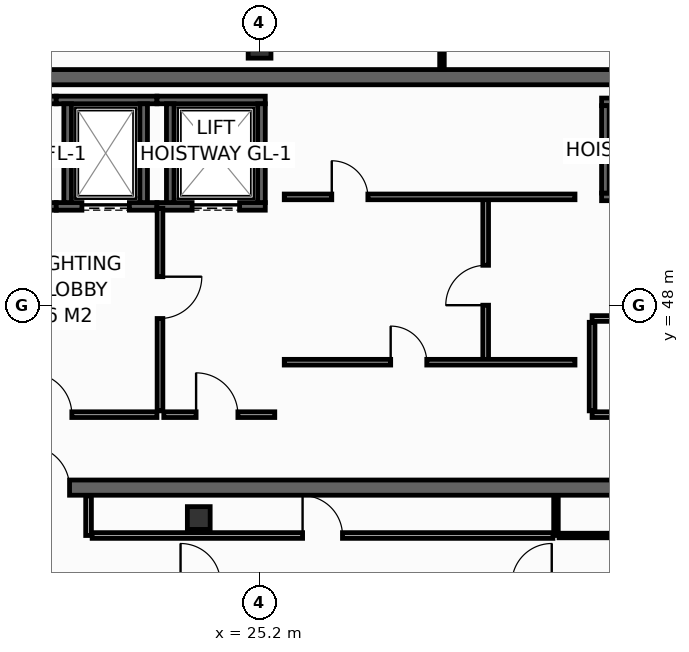
"""IFC4 building model, lengths in metres.
Left out: names, types, materials, properties, quantities, classifications, styles, units other than length and angle.
Written with IfcOpenShell. Run it as: python <this file> out.ifc"""

import sys

from ifc_helpers import new_model, si_unit, direction, frame, frame_2d, origin, origin_2d, place, context, subcontext, project, spatial, rectangle, hollow_rectangle, extrude, element, fill, save


model = new_model("IFC4")
c1 = context("Model", 3, precision=1e-05, world=origin(), true_north=direction((0.0, 1.0)))
c2 = subcontext(c1, "Body", "Model", "MODEL_VIEW")
j1 = project(units=[si_unit("LENGTHUNIT", "METRE"), si_unit("PLANEANGLEUNIT", "RADIAN")], contexts=[c1])
p1 = place(None, origin())
s1 = spatial("IfcSite", under=j1, at=p1, CompositionType="ELEMENT")
p2 = place(p1, origin())
s2 = spatial("IfcBuilding", under=s1, at=p2, CompositionType="ELEMENT")
p3 = place(p2, frame((0.0, 0.0, 295.2)))
s3 = spatial("IfcBuildingStorey", under=s2, at=p3, CompositionType="ELEMENT", Elevation=295.2)
p4 = place(p3, frame((13.7, 43.2, 0.0), z_axis=(0.0, 0.0, 1.0), x_axis=(1.0, 0.0, 0.0)))
e1 = element("IfcWall", 1, at=p4, inside=s3, PredefinedType="SHEAR", context=c2, shape_type="SweptSolid", body=[
    extrude(rectangle(XDim=32.5, YDim=0.4, at=frame_2d((16.25, 0.0))), origin(), (0.0, 0.0, 1.0), 3.55),
])
p5 = place(p4, frame((5.4, 0.0, 0.0)))
e2 = element("IfcOpeningElement", 2, at=p5, cuts=e1, PredefinedType="OPENING", context=c2, shape_type="SweptSolid", body=[
    extrude(rectangle(XDim=1.1, YDim=2.15, at=frame_2d((0.55, 1.075))), frame((0.0, 0.21, 0.0), z_axis=(0.0, -1.0, 0.0), x_axis=(1.0, 0.0, 0.0)), (0.0, 0.0, 1.0), 0.42),
])
p6 = place(p4, frame((25.6, 0.0, 0.0)))
e3 = element("IfcOpeningElement", 3, at=p6, cuts=e1, PredefinedType="OPENING", context=c2, shape_type="SweptSolid", body=[
    extrude(rectangle(XDim=1.1, YDim=2.15, at=frame_2d((0.55, 1.075))), frame((0.0, 0.21, 0.0), z_axis=(0.0, -1.0, 0.0), x_axis=(1.0, 0.0, 0.0)), (0.0, 0.0, 1.0), 0.42),
])
p7 = place(p3, frame((13.7, 54.0, 0.0), z_axis=(0.0, 0.0, 1.0), x_axis=(1.0, 0.0, 0.0)))
e4 = element("IfcWall", 4, at=p7, inside=s3, PredefinedType="SHEAR", context=c2, shape_type="SweptSolid", body=[
    extrude(rectangle(XDim=32.5, YDim=0.4, at=frame_2d((16.25, 0.0))), origin(), (0.0, 0.0, 1.0), 3.55),
])
for number, where, z_axis, x_axis in (
    (5, (25.2, 54.8, 0.0), (0.0, 0.0, 1.0), (1.0, 0.0, 0.0)),
    (6, (23.6, 42.4, 0.0), (0.0, 0.0, 1.0), (1.0, 0.0, 0.0)),
):
    element("IfcColumn", number, at=place(p3, frame(where, z_axis=z_axis, x_axis=x_axis)), inside=s3, PredefinedType="COLUMN", context=c2, shape_type="SweptSolid", body=[
        extrude(hollow_rectangle(XDim=0.6, YDim=0.6, WallThickness=0.028, at=origin_2d()), origin(), (0.0, 0.0, 1.0), 3.8),
    ])
p8 = place(p3, frame((17.33, 50.6, 0.0), z_axis=(0.0, 0.0, 1.0), x_axis=(1.0, 0.0, 0.0)))
e7 = element("IfcWall", 7, at=p8, inside=s3, PredefinedType="SHEAR", context=c2, shape_type="SweptSolid", body=[
    extrude(rectangle(XDim=2.52, YDim=0.2, at=frame_2d((1.26, 0.0))), origin(), (0.0, 0.0, 1.0), 3.55),
])
p9 = place(p8, frame((0.595, 0.0, 0.0)))
e8 = element("IfcOpeningElement", 8, at=p9, cuts=e7, PredefinedType="OPENING", context=c2, shape_type="SweptSolid", body=[
    extrude(rectangle(XDim=1.25, YDim=2.3, at=frame_2d((0.625, 1.15))), frame((0.0, 0.11, 0.0), z_axis=(0.0, -1.0, 0.0), x_axis=(1.0, 0.0, 0.0)), (0.0, 0.0, 1.0), 0.22),
])
p10 = place(p3, frame((17.33, 53.4, 0.0), z_axis=(0.0, 0.0, 1.0), x_axis=(1.0, 0.0, 0.0)))
e9 = element("IfcWall", 9, at=p10, inside=s3, PredefinedType="SHEAR", context=c2, shape_type="SweptSolid", body=[
    extrude(rectangle(XDim=2.52, YDim=0.2, at=frame_2d((1.26, 0.0))), origin(), (0.0, 0.0, 1.0), 3.55),
])
p11 = place(p3, frame((19.85, 50.6, 0.0), z_axis=(0.0, 0.0, 1.0), x_axis=(1.0, 0.0, 0.0)))
e10 = element("IfcWall", 10, at=p11, inside=s3, PredefinedType="SHEAR", context=c2, shape_type="SweptSolid", body=[
    extrude(rectangle(XDim=2.65, YDim=0.2, at=frame_2d((1.325, 0.0))), origin(), (0.0, 0.0, 1.0), 3.55),
])
p12 = place(p11, frame((0.675, 0.0, 0.0)))
e11 = element("IfcOpeningElement", 11, at=p12, cuts=e10, PredefinedType="OPENING", context=c2, shape_type="SweptSolid", body=[
    extrude(rectangle(XDim=1.25, YDim=2.3, at=frame_2d((0.625, 1.15))), frame((0.0, 0.11, 0.0), z_axis=(0.0, -1.0, 0.0), x_axis=(1.0, 0.0, 0.0)), (0.0, 0.0, 1.0), 0.22),
])
p13 = place(p3, frame((19.85, 53.4, 0.0), z_axis=(0.0, 0.0, 1.0), x_axis=(1.0, 0.0, 0.0)))
e12 = element("IfcWall", 12, at=p13, inside=s3, PredefinedType="SHEAR", context=c2, shape_type="SweptSolid", body=[
    extrude(rectangle(XDim=2.65, YDim=0.2, at=frame_2d((1.325, 0.0))), origin(), (0.0, 0.0, 1.0), 3.55),
])
for number, where, z_axis, x_axis in (
    (13, (20.15, 50.7, 0.0), (0.0, 0.0, 1.0), (0.0, 1.0, 0.0)),
    (14, (22.15, 50.7, 0.0), (0.0, 0.0, 1.0), (0.0, 1.0, 0.0)),
):
    element("IfcWall", number, at=place(p3, frame(where, z_axis=z_axis, x_axis=x_axis)), inside=s3, PredefinedType="SHEAR", context=c2, shape_type="SweptSolid", body=[
        extrude(rectangle(XDim=2.6, YDim=0.2, at=frame_2d((1.3, 0.0))), origin(), (0.0, 0.0, 1.0), 3.55),
    ])
p14 = place(p3, frame((22.5, 50.6, 0.0), z_axis=(0.0, 0.0, 1.0), x_axis=(1.0, 0.0, 0.0)))
e15 = element("IfcWall", 15, at=p14, inside=s3, PredefinedType="SHEAR", context=c2, shape_type="SweptSolid", body=[
    extrude(rectangle(XDim=2.85, YDim=0.2, at=frame_2d((1.425, 0.0))), origin(), (0.0, 0.0, 1.0), 3.55),
])
p15 = place(p14, frame((0.925, 0.0, 0.0)))
e16 = element("IfcOpeningElement", 16, at=p15, cuts=e15, PredefinedType="OPENING", context=c2, shape_type="SweptSolid", body=[
    extrude(rectangle(XDim=1.25, YDim=2.3, at=frame_2d((0.625, 1.15))), frame((0.0, 0.11, 0.0), z_axis=(0.0, -1.0, 0.0), x_axis=(1.0, 0.0, 0.0)), (0.0, 0.0, 1.0), 0.22),
])
p16 = place(p3, frame((22.5, 53.4, 0.0), z_axis=(0.0, 0.0, 1.0), x_axis=(1.0, 0.0, 0.0)))
e17 = element("IfcWall", 17, at=p16, inside=s3, PredefinedType="SHEAR", context=c2, shape_type="SweptSolid", body=[
    extrude(rectangle(XDim=2.85, YDim=0.2, at=frame_2d((1.425, 0.0))), origin(), (0.0, 0.0, 1.0), 3.55),
])
for number, where, z_axis, x_axis in (
    (18, (22.85, 50.7, 0.0), (0.0, 0.0, 1.0), (0.0, 1.0, 0.0)),
    (19, (25.25, 50.7, 0.0), (0.0, 0.0, 1.0), (0.0, 1.0, 0.0)),
):
    element("IfcWall", number, at=place(p3, frame(where, z_axis=z_axis, x_axis=x_axis)), inside=s3, PredefinedType="SHEAR", context=c2, shape_type="SweptSolid", body=[
        extrude(rectangle(XDim=2.6, YDim=0.2, at=frame_2d((1.3, 0.0))), origin(), (0.0, 0.0, 1.0), 3.55),
    ])
p17 = place(p3, frame((34.2, 50.85, 0.0), z_axis=(0.0, 0.0, 1.0), x_axis=(1.0, 0.0, 0.0)))
e20 = element("IfcWall", 20, at=p17, inside=s3, PredefinedType="SHEAR", context=c2, shape_type="SweptSolid", body=[
    extrude(rectangle(XDim=2.575, YDim=0.2, at=frame_2d((1.288, 0.0))), origin(), (0.0, 0.0, 1.0), 3.55),
])
p18 = place(p17, frame((0.65, 0.0, 0.0)))
e21 = element("IfcOpeningElement", 21, at=p18, cuts=e20, PredefinedType="OPENING", context=c2, shape_type="SweptSolid", body=[
    extrude(rectangle(XDim=1.1, YDim=2.2, at=frame_2d((0.55, 1.1))), frame((0.0, 0.11, 0.0), z_axis=(0.0, -1.0, 0.0), x_axis=(1.0, 0.0, 0.0)), (0.0, 0.0, 1.0), 0.22),
])
p19 = place(p3, frame((34.2, 53.35, 0.0), z_axis=(0.0, 0.0, 1.0), x_axis=(1.0, 0.0, 0.0)))
e22 = element("IfcWall", 22, at=p19, inside=s3, PredefinedType="SHEAR", context=c2, shape_type="SweptSolid", body=[
    extrude(rectangle(XDim=2.575, YDim=0.2, at=frame_2d((1.288, 0.0))), origin(), (0.0, 0.0, 1.0), 3.55),
])
p20 = place(p3, frame((34.3, 50.95, 0.0), z_axis=(0.0, 0.0, 1.0), x_axis=(0.0, 1.0, 0.0)))
e23 = element("IfcWall", 23, at=p20, inside=s3, PredefinedType="SHEAR", context=c2, shape_type="SweptSolid", body=[
    extrude(rectangle(XDim=2.3, YDim=0.2, at=frame_2d((1.15, 0.0))), origin(), (0.0, 0.0, 1.0), 3.55),
])
p21 = place(p3, frame((17.36, 45.12, 0.0), z_axis=(0.0, 0.0, 1.0), x_axis=(1.0, 0.0, 0.0)))
e24 = element("IfcWall", 24, at=p21, inside=s3, PredefinedType="PARTITIONING", context=c2, shape_type="SweptSolid", body=[
    extrude(rectangle(XDim=5.14, YDim=0.15, at=frame_2d((2.57, 0.0))), origin(), (0.0, 0.0, 1.0), 3.55),
])
p22 = place(p21, frame((1.8, 0.0, 0.0)))
e25 = element("IfcOpeningElement", 25, at=p22, cuts=e24, PredefinedType="OPENING", context=c2, shape_type="SweptSolid", body=[
    extrude(rectangle(XDim=1.1, YDim=2.15, at=frame_2d((0.55, 1.075))), frame((0.0, 0.085, 0.0), z_axis=(0.0, -1.0, 0.0), x_axis=(1.0, 0.0, 0.0)), (0.0, 0.0, 1.0), 0.17),
])
p23 = place(p3, frame((22.58, 50.55, 0.0), z_axis=(0.0, 0.0, 1.0), x_axis=(0.0, -1.0, 0.0)))
e26 = element("IfcWall", 26, at=p23, inside=s3, PredefinedType="PARTITIONING", context=c2, shape_type="SweptSolid", body=[
    extrude(rectangle(XDim=5.33, YDim=0.15, at=frame_2d((2.665, 0.0))), origin(), (0.0, 0.0, 1.0), 3.55),
])
p24 = place(p23, frame((1.8, 0.0, 0.0)))
e27 = element("IfcOpeningElement", 27, at=p24, cuts=e26, PredefinedType="OPENING", context=c2, shape_type="SweptSolid", body=[
    extrude(rectangle(XDim=1.1, YDim=2.15, at=frame_2d((0.55, 1.075))), frame((0.0, 0.085, 0.0), z_axis=(0.0, -1.0, 0.0), x_axis=(1.0, 0.0, 0.0)), (0.0, 0.0, 1.0), 0.17),
])
p25 = place(p3, frame((22.68, 45.12, 0.0), z_axis=(0.0, 0.0, 1.0), x_axis=(1.0, 0.0, 0.0)))
e28 = element("IfcWall", 28, at=p25, inside=s3, PredefinedType="PARTITIONING", context=c2, shape_type="SweptSolid", body=[
    extrude(rectangle(XDim=2.92, YDim=0.15, at=frame_2d((1.46, 0.0))), origin(), (0.0, 0.0, 1.0), 3.55),
])
p26 = place(p25, frame((0.85, 0.0, 0.0)))
e29 = element("IfcOpeningElement", 29, at=p26, cuts=e28, PredefinedType="OPENING", context=c2, shape_type="SweptSolid", body=[
    extrude(rectangle(XDim=1.1, YDim=2.15, at=frame_2d((0.55, 1.075))), frame((0.0, 0.085, 0.0), z_axis=(0.0, -1.0, 0.0), x_axis=(1.0, 0.0, 0.0)), (0.0, 0.0, 1.0), 0.17),
])
p27 = place(p3, frame((31.15, 46.5, 0.0), z_axis=(0.0, 0.0, 1.0), x_axis=(0.0, 1.0, 0.0)))
e30 = element("IfcWall", 30, at=p27, inside=s3, PredefinedType="PARTITIONING", context=c2, shape_type="SweptSolid", body=[
    extrude(rectangle(XDim=4.35, YDim=0.15, at=frame_2d((2.175, 0.0))), origin(), (0.0, 0.0, 1.0), 3.55),
])
p28 = place(p27, frame((1.5, 0.0, 0.0)))
e31 = element("IfcOpeningElement", 31, at=p28, cuts=e30, PredefinedType="OPENING", context=c2, shape_type="SweptSolid", body=[
    extrude(rectangle(XDim=1.05, YDim=2.15, at=frame_2d((0.525, 1.075))), frame((0.0, 0.085, 0.0), z_axis=(0.0, -1.0, 0.0), x_axis=(1.0, 0.0, 0.0)), (0.0, 0.0, 1.0), 0.17),
])
p29 = place(p3, frame((33.95, 45.12, 0.0), z_axis=(0.0, 0.0, 1.0), x_axis=(1.0, 0.0, 0.0)))
e32 = element("IfcWall", 32, at=p29, inside=s3, PredefinedType="PARTITIONING", context=c2, shape_type="SweptSolid", body=[
    extrude(rectangle(XDim=8.55, YDim=0.15, at=frame_2d((4.275, 0.0))), origin(), (0.0, 0.0, 1.0), 3.55),
])
p30 = place(p29, frame((0.95, 0.0, 0.0)))
e33 = element("IfcOpeningElement", 33, at=p30, cuts=e32, PredefinedType="OPENING", context=c2, shape_type="SweptSolid", body=[
    extrude(rectangle(XDim=0.95, YDim=2.15, at=frame_2d((0.475, 1.075))), frame((0.0, 0.085, 0.0), z_axis=(0.0, -1.0, 0.0), x_axis=(1.0, 0.0, 0.0)), (0.0, 0.0, 1.0), 0.17),
])
p31 = place(p29, frame((3.8, 0.0, 0.0)))
e34 = element("IfcOpeningElement", 34, at=p31, cuts=e32, PredefinedType="OPENING", context=c2, shape_type="SweptSolid", body=[
    extrude(rectangle(XDim=0.95, YDim=2.15, at=frame_2d((0.475, 1.075))), frame((0.0, 0.085, 0.0), z_axis=(0.0, -1.0, 0.0), x_axis=(1.0, 0.0, 0.0)), (0.0, 0.0, 1.0), 0.17),
])
p32 = place(p29, frame((6.65, 0.0, 0.0)))
e35 = element("IfcOpeningElement", 35, at=p32, cuts=e32, PredefinedType="OPENING", context=c2, shape_type="SweptSolid", body=[
    extrude(rectangle(XDim=0.95, YDim=2.15, at=frame_2d((0.475, 1.075))), frame((0.0, 0.085, 0.0), z_axis=(0.0, -1.0, 0.0), x_axis=(1.0, 0.0, 0.0)), (0.0, 0.0, 1.0), 0.17),
])
p33 = place(p3, frame((33.95, 47.65, 0.0), z_axis=(0.0, 0.0, 1.0), x_axis=(1.0, 0.0, 0.0)))
e36 = element("IfcWall", 36, at=p33, inside=s3, PredefinedType="PARTITIONING", context=c2, shape_type="SweptSolid", body=[
    extrude(rectangle(XDim=8.55, YDim=0.15, at=frame_2d((4.275, 0.0))), origin(), (0.0, 0.0, 1.0), 3.55),
])
p34 = place(p3, frame((33.95, 45.22, 0.0), z_axis=(0.0, 0.0, 1.0), x_axis=(0.0, 1.0, 0.0)))
e37 = element("IfcWall", 37, at=p34, inside=s3, PredefinedType="PARTITIONING", context=c2, shape_type="SweptSolid", body=[
    extrude(rectangle(XDim=2.33, YDim=0.15, at=frame_2d((1.165, 0.0))), origin(), (0.0, 0.0, 1.0), 3.55),
])
p35 = place(p3, frame((25.85, 50.85, 0.0), z_axis=(0.0, 0.0, 1.0), x_axis=(1.0, 0.0, 0.0)))
e38 = element("IfcWall", 38, at=p35, inside=s3, PredefinedType="PARTITIONING", context=c2, shape_type="SweptSolid", body=[
    extrude(rectangle(XDim=7.65, YDim=0.15, at=frame_2d((3.825, 0.0))), origin(), (0.0, 0.0, 1.0), 3.55),
])
p36 = place(p35, frame((1.25, 0.0, 0.0)))
e39 = element("IfcOpeningElement", 39, at=p36, cuts=e38, PredefinedType="OPENING", context=c2, shape_type="SweptSolid", body=[
    extrude(rectangle(XDim=0.95, YDim=2.15, at=frame_2d((0.475, 1.075))), frame((0.0, 0.085, 0.0), z_axis=(0.0, -1.0, 0.0), x_axis=(1.0, 0.0, 0.0)), (0.0, 0.0, 1.0), 0.17),
])
p37 = place(p3, frame((25.85, 46.5, 0.0), z_axis=(0.0, 0.0, 1.0), x_axis=(1.0, 0.0, 0.0)))
e40 = element("IfcWall", 40, at=p37, inside=s3, PredefinedType="PARTITIONING", context=c2, shape_type="SweptSolid", body=[
    extrude(rectangle(XDim=7.65, YDim=0.15, at=frame_2d((3.825, 0.0))), origin(), (0.0, 0.0, 1.0), 3.55),
])
p38 = place(p37, frame((2.8, 0.0, 0.0)))
e41 = element("IfcOpeningElement", 41, at=p38, cuts=e40, PredefinedType="OPENING", context=c2, shape_type="SweptSolid", body=[
    extrude(rectangle(XDim=0.95, YDim=2.15, at=frame_2d((0.475, 1.075))), frame((0.0, 0.085, 0.0), z_axis=(0.0, -1.0, 0.0), x_axis=(1.0, 0.0, 0.0)), (0.0, 0.0, 1.0), 0.17),
])
p39 = place(p3, frame((30.0, 54.22, 0.0), z_axis=(0.0, 0.0, 1.0), x_axis=(0.0, 1.0, 0.0)))
e42 = element("IfcWall", 42, at=p39, inside=s3, PredefinedType="PARTITIONING", context=c2, shape_type="SweptSolid", body=[
    extrude(rectangle(XDim=1.775, YDim=0.12, at=frame_2d((0.888, 0.0))), origin(), (0.0, 0.0, 1.0), 2.935),
])
p40 = place(p3, frame((20.7, 41.94, 0.0), z_axis=(0.0, 0.0, 1.0), x_axis=(0.0, 1.0, 0.0)))
e43 = element("IfcWall", 43, at=p40, inside=s3, PredefinedType="PARTITIONING", context=c2, shape_type="SweptSolid", body=[
    extrude(rectangle(XDim=1.04, YDim=0.15, at=frame_2d((0.52, 0.0))), origin(), (0.0, 0.0, 1.0), 3.55),
])
p41 = place(p3, frame((33.0, 41.94, 0.0), z_axis=(0.0, 0.0, 1.0), x_axis=(0.0, 1.0, 0.0)))
e44 = element("IfcWall", 44, at=p41, inside=s3, PredefinedType="PARTITIONING", context=c2, shape_type="SweptSolid", body=[
    extrude(rectangle(XDim=1.04, YDim=0.12, at=frame_2d((0.52, 0.0))), origin(), (0.0, 0.0, 1.0), 2.947),
])
p42 = place(p3, frame((20.795, 41.94, 0.0), z_axis=(0.0, 0.0, 1.0), x_axis=(1.0, 0.0, 0.0)))
e45 = element("IfcWall", 45, at=p42, inside=s3, PredefinedType="PARTITIONING", context=c2, shape_type="SweptSolid", body=[
    extrude(rectangle(XDim=12.125, YDim=0.15, at=frame_2d((6.062, 0.0))), origin(), (0.0, 0.0, 1.0), 3.047),
])
p43 = place(p42, frame((5.537, 0.0, 0.0)))
e46 = element("IfcOpeningElement", 46, at=p43, cuts=e45, PredefinedType="OPENING", context=c2, shape_type="SweptSolid", body=[
    extrude(rectangle(XDim=1.05, YDim=2.15, at=frame_2d((0.525, 1.075))), frame((0.0, 0.085, 0.0), z_axis=(0.0, -1.0, 0.0), x_axis=(1.0, 0.0, 0.0)), (0.0, 0.0, 1.0), 0.17),
])
p44 = place(p3, frame((33.08, 41.94, 0.0), z_axis=(0.0, 0.0, 1.0), x_axis=(1.0, 0.0, 0.0)))
e47 = element("IfcWall", 47, at=p44, inside=s3, PredefinedType="PARTITIONING", context=c2, shape_type="SweptSolid", body=[
    extrude(rectangle(XDim=5.625, YDim=0.12, at=frame_2d((2.812, 0.0))), origin(), (0.0, 0.0, 1.0), 3.047),
])
p45 = place(p44, frame((1.923, 0.0, 0.0)))
e48 = element("IfcOpeningElement", 48, at=p45, cuts=e47, PredefinedType="OPENING", context=c2, shape_type="SweptSolid", body=[
    extrude(rectangle(XDim=0.9, YDim=2.1, at=frame_2d((0.45, 1.05))), frame((0.0, 0.07, 0.0), z_axis=(0.0, -1.0, 0.0), x_axis=(1.0, 0.0, 0.0)), (0.0, 0.0, 1.0), 0.14),
])
p46 = place(p12, origin())
e49 = element("IfcDoor", 49, at=p46, inside=s3, OperationType="SLIDING_TO_LEFT", PredefinedType="DOOR", context=c2, shape_type="SweptSolid", body=[
    extrude(rectangle(XDim=1.25, YDim=2.3, at=frame_2d((0.625, 1.15))), frame((0.0, 0.025, 0.0), z_axis=(0.0, -1.0, 0.0), x_axis=(1.0, 0.0, 0.0)), (0.0, 0.0, 1.0), 0.05),
])
fill(e11, e49)
p47 = place(p15, origin())
e50 = element("IfcDoor", 50, at=p47, inside=s3, OperationType="SLIDING_TO_LEFT", PredefinedType="DOOR", context=c2, shape_type="SweptSolid", body=[
    extrude(rectangle(XDim=1.25, YDim=2.3, at=frame_2d((0.625, 1.15))), frame((0.0, 0.025, 0.0), z_axis=(0.0, -1.0, 0.0), x_axis=(1.0, 0.0, 0.0)), (0.0, 0.0, 1.0), 0.05),
])
fill(e16, e50)
p48 = place(p22, origin())
e51 = element("IfcDoor", 51, at=p48, inside=s3, OperationType="SINGLE_SWING_LEFT", PredefinedType="DOOR", context=c2, shape_type="SweptSolid", body=[
    extrude(rectangle(XDim=1.1, YDim=2.15, at=frame_2d((0.55, 1.075))), frame((0.0, 0.025, 0.0), z_axis=(0.0, -1.0, 0.0), x_axis=(1.0, 0.0, 0.0)), (0.0, 0.0, 1.0), 0.05),
])
fill(e25, e51)
p49 = place(p24, origin())
e52 = element("IfcDoor", 52, at=p49, inside=s3, OperationType="SINGLE_SWING_LEFT", PredefinedType="DOOR", context=c2, shape_type="SweptSolid", body=[
    extrude(rectangle(XDim=1.1, YDim=2.15, at=frame_2d((0.55, 1.075))), frame((0.0, 0.025, 0.0), z_axis=(0.0, -1.0, 0.0), x_axis=(1.0, 0.0, 0.0)), (0.0, 0.0, 1.0), 0.05),
])
fill(e27, e52)
p50 = place(p26, origin())
e53 = element("IfcDoor", 53, at=p50, inside=s3, OperationType="SINGLE_SWING_LEFT", PredefinedType="DOOR", context=c2, shape_type="SweptSolid", body=[
    extrude(rectangle(XDim=1.1, YDim=2.15, at=frame_2d((0.55, 1.075))), frame((0.0, 0.025, 0.0), z_axis=(0.0, -1.0, 0.0), x_axis=(1.0, 0.0, 0.0)), (0.0, 0.0, 1.0), 0.05),
])
fill(e29, e53)
p51 = place(p5, origin())
e54 = element("IfcDoor", 54, at=p51, inside=s3, OperationType="SINGLE_SWING_LEFT", PredefinedType="DOOR", context=c2, shape_type="SweptSolid", body=[
    extrude(rectangle(XDim=1.1, YDim=2.15, at=frame_2d((0.55, 1.075))), frame((0.0, 0.025, 0.0), z_axis=(0.0, -1.0, 0.0), x_axis=(1.0, 0.0, 0.0)), (0.0, 0.0, 1.0), 0.05),
])
fill(e2, e54)
p52 = place(p28, origin())
e55 = element("IfcDoor", 55, at=p52, inside=s3, OperationType="SINGLE_SWING_LEFT", PredefinedType="DOOR", context=c2, shape_type="SweptSolid", body=[
    extrude(rectangle(XDim=1.05, YDim=2.15, at=frame_2d((0.525, 1.075))), frame((0.0, 0.025, 0.0), z_axis=(0.0, -1.0, 0.0), x_axis=(1.0, 0.0, 0.0)), (0.0, 0.0, 1.0), 0.05),
])
fill(e31, e55)
p53 = place(p36, origin())
e56 = element("IfcDoor", 56, at=p53, inside=s3, OperationType="SINGLE_SWING_LEFT", PredefinedType="DOOR", context=c2, shape_type="SweptSolid", body=[
    extrude(rectangle(XDim=0.95, YDim=2.15, at=frame_2d((0.475, 1.075))), frame((0.0, 0.025, 0.0), z_axis=(0.0, -1.0, 0.0), x_axis=(1.0, 0.0, 0.0)), (0.0, 0.0, 1.0), 0.05),
])
fill(e39, e56)
p54 = place(p38, origin())
e57 = element("IfcDoor", 57, at=p54, inside=s3, OperationType="SINGLE_SWING_LEFT", PredefinedType="DOOR", context=c2, shape_type="SweptSolid", body=[
    extrude(rectangle(XDim=0.95, YDim=2.15, at=frame_2d((0.475, 1.075))), frame((0.0, 0.025, 0.0), z_axis=(0.0, -1.0, 0.0), x_axis=(1.0, 0.0, 0.0)), (0.0, 0.0, 1.0), 0.05),
])
fill(e41, e57)
p55 = place(p43, origin())
e58 = element("IfcDoor", 58, at=p55, inside=s3, OperationType="SINGLE_SWING_LEFT", PredefinedType="DOOR", context=c2, shape_type="SweptSolid", body=[
    extrude(rectangle(XDim=1.05, YDim=2.15, at=frame_2d((0.525, 1.075))), frame((0.0, 0.025, 0.0), z_axis=(0.0, -1.0, 0.0), x_axis=(1.0, 0.0, 0.0)), (0.0, 0.0, 1.0), 0.05),
])
fill(e46, e58)
save(model, sys.argv[1])
